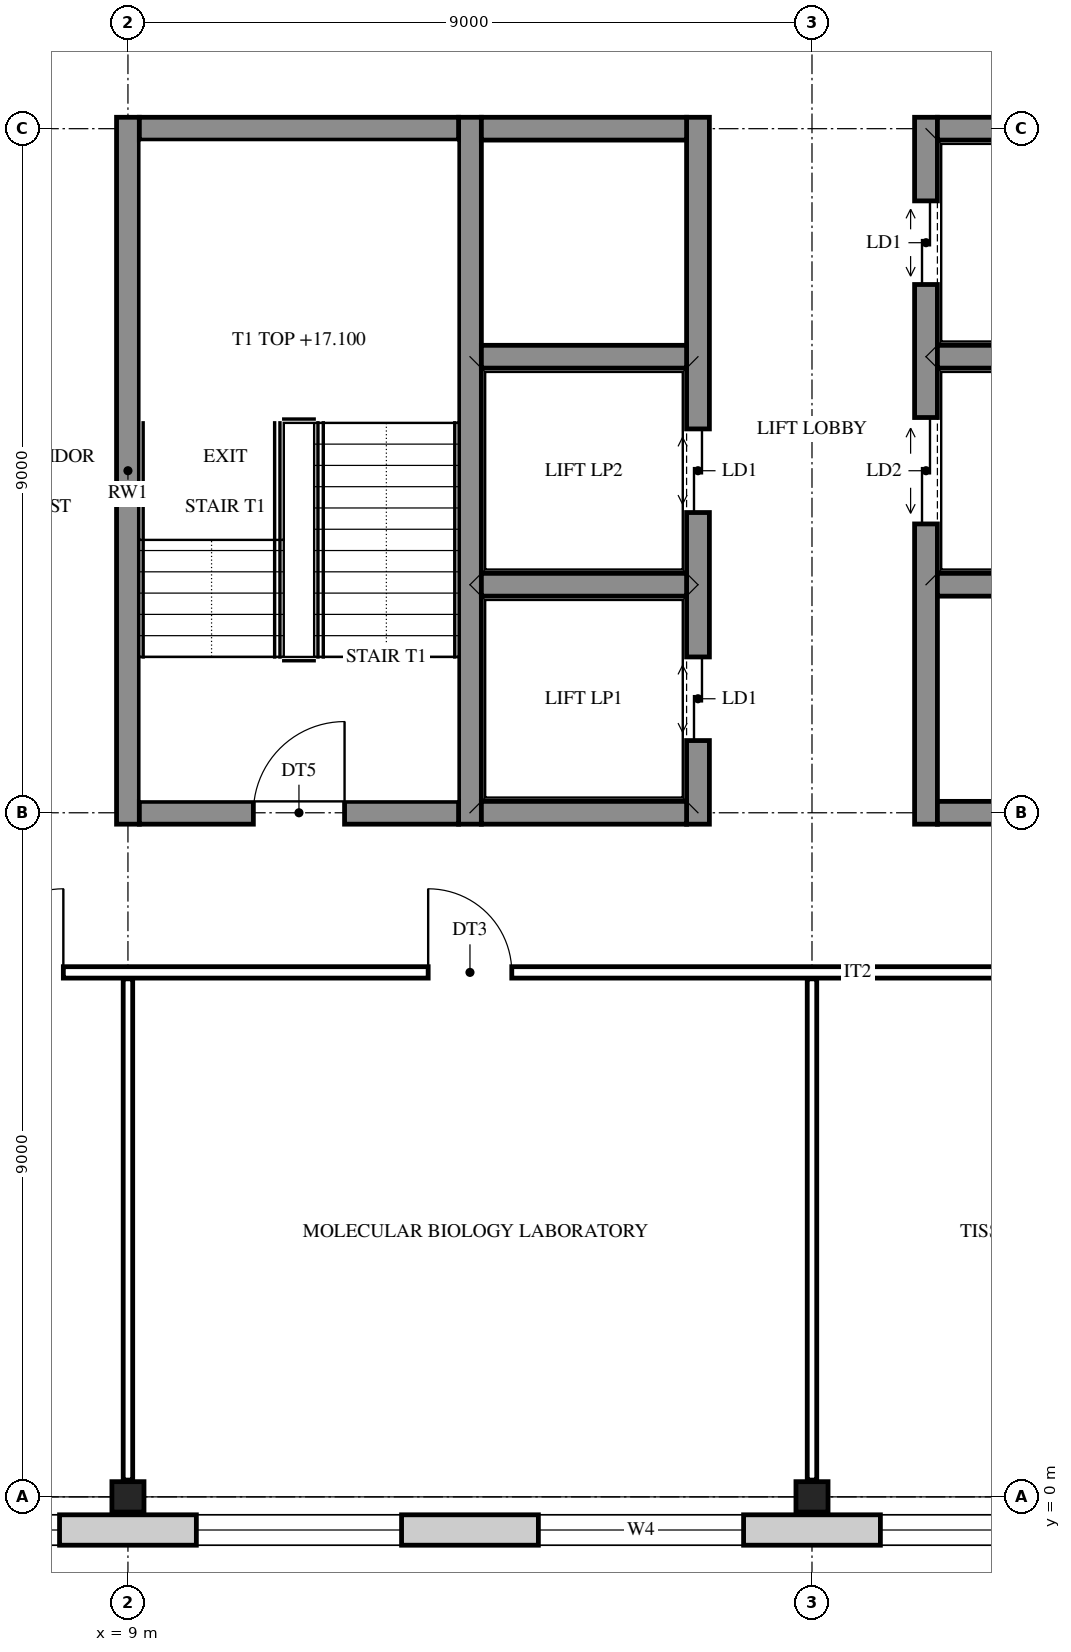
"""IFC4 building model, lengths in metres.
Left out: names, types, materials, properties, quantities, classifications, styles, units other than length and angle.
Written with IfcOpenShell. Run it as: python <this file> out.ifc"""

import sys

from ifc_helpers import new_model, si_unit, direction, frame, frame_2d, origin, origin_2d, place, context, subcontext, project, spatial, rectangle, i_section, extrude, element, fill, save


model = new_model("IFC4")
c1 = context("Model", 3, precision=1e-05, world=origin(), true_north=direction((0.0, 1.0)))
c2 = subcontext(c1, "Body", "Model", "MODEL_VIEW")
j1 = project(units=[si_unit("LENGTHUNIT", "METRE"), si_unit("PLANEANGLEUNIT", "RADIAN")], contexts=[c1])
p1 = place(None, origin())
s1 = spatial("IfcSite", under=j1, at=p1, CompositionType="ELEMENT")
p2 = place(p1, origin())
s2 = spatial("IfcBuilding", under=s1, at=p2, CompositionType="ELEMENT")
p3 = place(p2, frame((0.0, 0.0, 15.0)))
s3 = spatial("IfcBuildingStorey", under=s2, at=p3, CompositionType="ELEMENT", Elevation=15.0)
for number, where, z_axis, x_axis in (
    (1, (9.0, 0.0, 0.0), (0.0, 0.0, 1.0), (0.0, 1.0, 0.0)),
    (2, (18.0, 0.0, 0.0), (0.0, 0.0, 1.0), (0.0, 1.0, 0.0)),
):
    element("IfcColumn", number, at=place(p3, frame(where, z_axis=z_axis, x_axis=x_axis)), inside=s3, PredefinedType="COLUMN", context=c2, shape_type="SweptSolid", body=[
        extrude(i_section(OverallWidth=0.4, OverallDepth=0.422, WebThickness=0.028, FlangeThickness=0.036, at=origin_2d()), origin(), (0.0, 0.0, 1.0), 4.2),
    ])
for number, where, z_axis, x_axis in (
    (3, (9.0, 8.85, 0.0), (0.0, 0.0, 1.0), (0.0, 1.0, 0.0)),
    (4, (13.5, 8.85, 0.0), (0.0, 0.0, 1.0), (0.0, 1.0, 0.0)),
):
    element("IfcWall", number, at=place(p3, frame(where, z_axis=z_axis, x_axis=x_axis)), inside=s3, PredefinedType="SHEAR", context=c2, shape_type="SweptSolid", body=[
        extrude(rectangle(XDim=9.3, YDim=0.3, at=frame_2d((4.65, 0.0))), origin(), (0.0, 0.0, 1.0), 4.2),
    ])
p4 = place(p3, frame((16.5, 8.85, 0.0), z_axis=(0.0, 0.0, 1.0), x_axis=(0.0, 1.0, 0.0)))
e5 = element("IfcWall", 5, at=p4, inside=s3, PredefinedType="SHEAR", context=c2, shape_type="SweptSolid", body=[
    extrude(rectangle(XDim=9.3, YDim=0.3, at=frame_2d((4.65, 0.0))), origin(), (0.0, 0.0, 1.0), 4.2),
])
p5 = place(p4, frame((1.1, 0.0, 0.0)))
e6 = element("IfcOpeningElement", 6, at=p5, cuts=e5, PredefinedType="OPENING", context=c2, shape_type="SweptSolid", body=[
    extrude(rectangle(XDim=1.1, YDim=2.1, at=frame_2d((0.55, 1.05))), frame((0.0, 0.16, 0.0), z_axis=(0.0, -1.0, 0.0), x_axis=(1.0, 0.0, 0.0)), (0.0, 0.0, 1.0), 0.32),
])
p6 = place(p4, frame((4.1, 0.0, 0.0)))
e7 = element("IfcOpeningElement", 7, at=p6, cuts=e5, PredefinedType="OPENING", context=c2, shape_type="SweptSolid", body=[
    extrude(rectangle(XDim=1.1, YDim=2.1, at=frame_2d((0.55, 1.05))), frame((0.0, 0.16, 0.0), z_axis=(0.0, -1.0, 0.0), x_axis=(1.0, 0.0, 0.0)), (0.0, 0.0, 1.0), 0.32),
])
p7 = place(p3, frame((19.5, 8.85, 0.0), z_axis=(0.0, 0.0, 1.0), x_axis=(0.0, 1.0, 0.0)))
e8 = element("IfcWall", 8, at=p7, inside=s3, PredefinedType="SHEAR", context=c2, shape_type="SweptSolid", body=[
    extrude(rectangle(XDim=9.3, YDim=0.3, at=frame_2d((4.65, 0.0))), origin(), (0.0, 0.0, 1.0), 4.2),
])
p8 = place(p7, frame((3.95, 0.0, 0.0)))
e9 = element("IfcOpeningElement", 9, at=p8, cuts=e8, PredefinedType="OPENING", context=c2, shape_type="SweptSolid", body=[
    extrude(rectangle(XDim=1.4, YDim=2.1, at=frame_2d((0.7, 1.05))), frame((0.0, 0.16, 0.0), z_axis=(0.0, -1.0, 0.0), x_axis=(1.0, 0.0, 0.0)), (0.0, 0.0, 1.0), 0.32),
])
p9 = place(p7, frame((7.1, 0.0, 0.0)))
e10 = element("IfcOpeningElement", 10, at=p9, cuts=e8, PredefinedType="OPENING", context=c2, shape_type="SweptSolid", body=[
    extrude(rectangle(XDim=1.1, YDim=2.1, at=frame_2d((0.55, 1.05))), frame((0.0, 0.16, 0.0), z_axis=(0.0, -1.0, 0.0), x_axis=(1.0, 0.0, 0.0)), (0.0, 0.0, 1.0), 0.32),
])
p10 = place(p3, frame((9.15, 9.0, 0.0), z_axis=(0.0, 0.0, 1.0), x_axis=(1.0, 0.0, 0.0)))
e11 = element("IfcWall", 11, at=p10, inside=s3, PredefinedType="SHEAR", context=c2, shape_type="SweptSolid", body=[
    extrude(rectangle(XDim=4.2, YDim=0.3, at=frame_2d((2.1, 0.0))), origin(), (0.0, 0.0, 1.0), 4.2),
])
p11 = place(p10, frame((1.5, 0.0, 0.0)))
e12 = element("IfcOpeningElement", 12, at=p11, cuts=e11, PredefinedType="OPENING", context=c2, shape_type="SweptSolid", body=[
    extrude(rectangle(XDim=1.2, YDim=2.1, at=frame_2d((0.6, 1.05))), frame((0.0, 0.16, 0.0), z_axis=(0.0, -1.0, 0.0), x_axis=(1.0, 0.0, 0.0)), (0.0, 0.0, 1.0), 0.32),
])
for number, where, z_axis, x_axis in (
    (13, (13.65, 9.0, 0.0), (0.0, 0.0, 1.0), (1.0, 0.0, 0.0)),
    (14, (19.65, 9.0, 0.0), (0.0, 0.0, 1.0), (1.0, 0.0, 0.0)),
    (15, (13.65, 12.0, 0.0), (0.0, 0.0, 1.0), (1.0, 0.0, 0.0)),
    (16, (19.65, 12.0, 0.0), (0.0, 0.0, 1.0), (1.0, 0.0, 0.0)),
    (17, (13.65, 15.0, 0.0), (0.0, 0.0, 1.0), (1.0, 0.0, 0.0)),
    (18, (19.65, 15.0, 0.0), (0.0, 0.0, 1.0), (1.0, 0.0, 0.0)),
):
    element("IfcWall", number, at=place(p3, frame(where, z_axis=z_axis, x_axis=x_axis)), inside=s3, PredefinedType="SHEAR", context=c2, shape_type="SweptSolid", body=[
        extrude(rectangle(XDim=2.7, YDim=0.3, at=frame_2d((1.35, 0.0))), origin(), (0.0, 0.0, 1.0), 4.2),
    ])
p12 = place(p3, frame((9.15, 18.0, 0.0), z_axis=(0.0, 0.0, 1.0), x_axis=(1.0, 0.0, 0.0)))
e19 = element("IfcWall", 19, at=p12, inside=s3, PredefinedType="SHEAR", context=c2, shape_type="SweptSolid", body=[
    extrude(rectangle(XDim=4.2, YDim=0.3, at=frame_2d((2.1, 0.0))), origin(), (0.0, 0.0, 1.0), 4.2),
])
for number, where, z_axis, x_axis in (
    (20, (13.65, 18.0, 0.0), (0.0, 0.0, 1.0), (1.0, 0.0, 0.0)),
    (21, (19.65, 18.0, 0.0), (0.0, 0.0, 1.0), (1.0, 0.0, 0.0)),
):
    element("IfcWall", number, at=place(p3, frame(where, z_axis=z_axis, x_axis=x_axis)), inside=s3, PredefinedType="SHEAR", context=c2, shape_type="SweptSolid", body=[
        extrude(rectangle(XDim=2.7, YDim=0.3, at=frame_2d((1.35, 0.0))), origin(), (0.0, 0.0, 1.0), 4.2),
    ])
p13 = place(p3, frame((32.125, -0.436, 0.0), z_axis=(0.0, 0.0, 1.0), x_axis=(-1.0, 0.0, 0.0)))
e22 = element("IfcWall", 22, at=p13, inside=s3, PredefinedType="STANDARD", context=c2, shape_type="SweptSolid", body=[
    extrude(rectangle(XDim=32.75, YDim=0.4, at=frame_2d((16.375, 0.0))), origin(), (0.0, 0.0, 1.0), 4.2),
])
p14 = place(p13, frame((28.525, 0.0, 0.9)))
e23 = element("IfcOpeningElement", 23, at=p14, cuts=e22, PredefinedType="OPENING", context=c2, shape_type="SweptSolid", body=[
    extrude(rectangle(XDim=2.7, YDim=2.5, at=frame_2d((1.35, 1.25))), frame((0.0, 0.21, 0.0), z_axis=(0.0, -1.0, 0.0), x_axis=(1.0, 0.0, 0.0)), (0.0, 0.0, 1.0), 0.42),
])
p15 = place(p13, frame((24.025, 0.0, 0.9)))
e24 = element("IfcOpeningElement", 24, at=p15, cuts=e22, PredefinedType="OPENING", context=c2, shape_type="SweptSolid", body=[
    extrude(rectangle(XDim=2.7, YDim=2.5, at=frame_2d((1.35, 1.25))), frame((0.0, 0.21, 0.0), z_axis=(0.0, -1.0, 0.0), x_axis=(1.0, 0.0, 0.0)), (0.0, 0.0, 1.0), 0.42),
])
p16 = place(p13, frame((19.525, 0.0, 0.9)))
e25 = element("IfcOpeningElement", 25, at=p16, cuts=e22, PredefinedType="OPENING", context=c2, shape_type="SweptSolid", body=[
    extrude(rectangle(XDim=2.7, YDim=2.5, at=frame_2d((1.35, 1.25))), frame((0.0, 0.21, 0.0), z_axis=(0.0, -1.0, 0.0), x_axis=(1.0, 0.0, 0.0)), (0.0, 0.0, 1.0), 0.42),
])
p17 = place(p13, frame((15.025, 0.0, 0.9)))
e26 = element("IfcOpeningElement", 26, at=p17, cuts=e22, PredefinedType="OPENING", context=c2, shape_type="SweptSolid", body=[
    extrude(rectangle(XDim=2.7, YDim=2.5, at=frame_2d((1.35, 1.25))), frame((0.0, 0.21, 0.0), z_axis=(0.0, -1.0, 0.0), x_axis=(1.0, 0.0, 0.0)), (0.0, 0.0, 1.0), 0.42),
])
p18 = place(p13, frame((10.525, 0.0, 0.9)))
e27 = element("IfcOpeningElement", 27, at=p18, cuts=e22, PredefinedType="OPENING", context=c2, shape_type="SweptSolid", body=[
    extrude(rectangle(XDim=2.7, YDim=2.5, at=frame_2d((1.35, 1.25))), frame((0.0, 0.21, 0.0), z_axis=(0.0, -1.0, 0.0), x_axis=(1.0, 0.0, 0.0)), (0.0, 0.0, 1.0), 0.42),
])
p19 = place(p13, frame((6.025, 0.0, 0.9)))
e28 = element("IfcOpeningElement", 28, at=p19, cuts=e22, PredefinedType="OPENING", context=c2, shape_type="SweptSolid", body=[
    extrude(rectangle(XDim=2.7, YDim=2.5, at=frame_2d((1.35, 1.25))), frame((0.0, 0.21, 0.0), z_axis=(0.0, -1.0, 0.0), x_axis=(1.0, 0.0, 0.0)), (0.0, 0.0, 1.0), 0.42),
])
p20 = place(p13, frame((1.525, 0.0, 0.9)))
e29 = element("IfcOpeningElement", 29, at=p20, cuts=e22, PredefinedType="OPENING", context=c2, shape_type="SweptSolid", body=[
    extrude(rectangle(XDim=2.7, YDim=2.5, at=frame_2d((1.35, 1.25))), frame((0.0, 0.21, 0.0), z_axis=(0.0, -1.0, 0.0), x_axis=(1.0, 0.0, 0.0)), (0.0, 0.0, 1.0), 0.42),
])
for number, where, z_axis, x_axis in (
    (30, (9.0, 0.221, 0.0), (0.0, 0.0, 1.0), (0.0, 1.0, 0.0)),
    (31, (18.0, 0.221, 0.0), (0.0, 0.0, 1.0), (0.0, 1.0, 0.0)),
):
    element("IfcWall", number, at=place(p3, frame(where, z_axis=z_axis, x_axis=x_axis)), inside=s3, PredefinedType="PARTITIONING", context=c2, shape_type="SweptSolid", body=[
        extrude(rectangle(XDim=6.594, YDim=0.125, at=frame_2d((3.297, 0.0))), origin(), (0.0, 0.0, 1.0), 3.537),
    ])
p21 = place(p3, frame((6.9, 6.9, 0.0), z_axis=(0.0, 0.0, 1.0), x_axis=(1.0, 0.0, 0.0)))
e32 = element("IfcWall", 32, at=p21, inside=s3, PredefinedType="PARTITIONING", context=c2, shape_type="SweptSolid", body=[
    extrude(rectangle(XDim=20.1, YDim=0.15, at=frame_2d((10.05, 0.0))), origin(), (0.0, 0.0, 1.0), 3.537),
])
p22 = place(p21, frame((0.15, 0.0, 0.0)))
e33 = element("IfcOpeningElement", 33, at=p22, cuts=e32, PredefinedType="OPENING", context=c2, shape_type="SweptSolid", body=[
    extrude(rectangle(XDim=1.1, YDim=2.1, at=frame_2d((0.55, 1.05))), frame((0.0, 0.085, 0.0), z_axis=(0.0, -1.0, 0.0), x_axis=(1.0, 0.0, 0.0)), (0.0, 0.0, 1.0), 0.17),
])
p23 = place(p21, frame((6.05, 0.0, 0.0)))
e34 = element("IfcOpeningElement", 34, at=p23, cuts=e32, PredefinedType="OPENING", context=c2, shape_type="SweptSolid", body=[
    extrude(rectangle(XDim=1.1, YDim=2.1, at=frame_2d((0.55, 1.05))), frame((0.0, 0.085, 0.0), z_axis=(0.0, -1.0, 0.0), x_axis=(1.0, 0.0, 0.0)), (0.0, 0.0, 1.0), 0.17),
])
p24 = place(p21, frame((16.25, 0.0, 0.0)))
e35 = element("IfcOpeningElement", 35, at=p24, cuts=e32, PredefinedType="OPENING", context=c2, shape_type="SweptSolid", body=[
    extrude(rectangle(XDim=1.1, YDim=2.1, at=frame_2d((0.55, 1.05))), frame((0.0, 0.085, 0.0), z_axis=(0.0, -1.0, 0.0), x_axis=(1.0, 0.0, 0.0)), (0.0, 0.0, 1.0), 0.17),
])
p25 = place(p15, origin())
e36 = element("IfcWindow", 36, at=p25, inside=s3, PartitioningType="SINGLE_PANEL", PredefinedType="WINDOW", context=c2, shape_type="SweptSolid", body=[
    extrude(rectangle(XDim=2.7, YDim=2.5, at=frame_2d((1.35, 1.25))), frame((0.0, 0.03, 0.0), z_axis=(0.0, -1.0, 0.0), x_axis=(1.0, 0.0, 0.0)), (0.0, 0.0, 1.0), 0.06),
])
fill(e24, e36)
p26 = place(p16, origin())
e37 = element("IfcWindow", 37, at=p26, inside=s3, PartitioningType="SINGLE_PANEL", PredefinedType="WINDOW", context=c2, shape_type="SweptSolid", body=[
    extrude(rectangle(XDim=2.7, YDim=2.5, at=frame_2d((1.35, 1.25))), frame((0.0, 0.03, 0.0), z_axis=(0.0, -1.0, 0.0), x_axis=(1.0, 0.0, 0.0)), (0.0, 0.0, 1.0), 0.06),
])
fill(e25, e37)
p27 = place(p17, origin())
e38 = element("IfcWindow", 38, at=p27, inside=s3, PartitioningType="SINGLE_PANEL", PredefinedType="WINDOW", context=c2, shape_type="SweptSolid", body=[
    extrude(rectangle(XDim=2.7, YDim=2.5, at=frame_2d((1.35, 1.25))), frame((0.0, 0.03, 0.0), z_axis=(0.0, -1.0, 0.0), x_axis=(1.0, 0.0, 0.0)), (0.0, 0.0, 1.0), 0.06),
])
fill(e26, e38)
p28 = place(p18, origin())
e39 = element("IfcWindow", 39, at=p28, inside=s3, PartitioningType="SINGLE_PANEL", PredefinedType="WINDOW", context=c2, shape_type="SweptSolid", body=[
    extrude(rectangle(XDim=2.7, YDim=2.5, at=frame_2d((1.35, 1.25))), frame((0.0, 0.03, 0.0), z_axis=(0.0, -1.0, 0.0), x_axis=(1.0, 0.0, 0.0)), (0.0, 0.0, 1.0), 0.06),
])
fill(e27, e39)
p29 = place(p11, origin())
e40 = element("IfcDoor", 40, at=p29, inside=s3, OperationType="SINGLE_SWING_RIGHT", PredefinedType="DOOR", context=c2, shape_type="SweptSolid", body=[
    extrude(rectangle(XDim=1.2, YDim=2.1, at=frame_2d((0.6, 1.05))), frame((0.0, 0.025, 0.0), z_axis=(0.0, -1.0, 0.0), x_axis=(1.0, 0.0, 0.0)), (0.0, 0.0, 1.0), 0.05),
])
fill(e12, e40)
p30 = place(p22, frame((1.1, 0.0, 0.0), z_axis=(0.0, 0.0, 1.0), x_axis=(-1.0, 0.0, 0.0)))
e41 = element("IfcDoor", 41, at=p30, inside=s3, OperationType="SINGLE_SWING_RIGHT", PredefinedType="DOOR", context=c2, shape_type="SweptSolid", body=[
    extrude(rectangle(XDim=1.1, YDim=2.1, at=frame_2d((0.55, 1.05))), frame((0.0, 0.025, 0.0), z_axis=(0.0, -1.0, 0.0), x_axis=(1.0, 0.0, 0.0)), (0.0, 0.0, 1.0), 0.05),
])
fill(e33, e41)
p31 = place(p23, frame((1.1, 0.0, 0.0), z_axis=(0.0, 0.0, 1.0), x_axis=(-1.0, 0.0, 0.0)))
e42 = element("IfcDoor", 42, at=p31, inside=s3, OperationType="SINGLE_SWING_LEFT", PredefinedType="DOOR", context=c2, shape_type="SweptSolid", body=[
    extrude(rectangle(XDim=1.1, YDim=2.1, at=frame_2d((0.55, 1.05))), frame((0.0, 0.025, 0.0), z_axis=(0.0, -1.0, 0.0), x_axis=(1.0, 0.0, 0.0)), (0.0, 0.0, 1.0), 0.05),
])
fill(e34, e42)
p32 = place(p5, origin())
e43 = element("IfcDoor", 43, at=p32, inside=s3, OperationType="DOUBLE_DOOR_SLIDING", PredefinedType="DOOR", context=c2, shape_type="SweptSolid", body=[
    extrude(rectangle(XDim=1.1, YDim=2.1, at=frame_2d((0.55, 1.05))), frame((0.0, 0.025, 0.0), z_axis=(0.0, -1.0, 0.0), x_axis=(1.0, 0.0, 0.0)), (0.0, 0.0, 1.0), 0.05),
])
fill(e6, e43)
p33 = place(p6, origin())
e44 = element("IfcDoor", 44, at=p33, inside=s3, OperationType="DOUBLE_DOOR_SLIDING", PredefinedType="DOOR", context=c2, shape_type="SweptSolid", body=[
    extrude(rectangle(XDim=1.1, YDim=2.1, at=frame_2d((0.55, 1.05))), frame((0.0, 0.025, 0.0), z_axis=(0.0, -1.0, 0.0), x_axis=(1.0, 0.0, 0.0)), (0.0, 0.0, 1.0), 0.05),
])
fill(e7, e44)
p34 = place(p8, origin())
e45 = element("IfcDoor", 45, at=p34, inside=s3, OperationType="DOUBLE_DOOR_SLIDING", PredefinedType="DOOR", context=c2, shape_type="SweptSolid", body=[
    extrude(rectangle(XDim=1.4, YDim=2.1, at=frame_2d((0.7, 1.05))), frame((0.0, 0.025, 0.0), z_axis=(0.0, -1.0, 0.0), x_axis=(1.0, 0.0, 0.0)), (0.0, 0.0, 1.0), 0.05),
])
fill(e9, e45)
p35 = place(p9, origin())
e46 = element("IfcDoor", 46, at=p35, inside=s3, OperationType="DOUBLE_DOOR_SLIDING", PredefinedType="DOOR", context=c2, shape_type="SweptSolid", body=[
    extrude(rectangle(XDim=1.1, YDim=2.1, at=frame_2d((0.55, 1.05))), frame((0.0, 0.025, 0.0), z_axis=(0.0, -1.0, 0.0), x_axis=(1.0, 0.0, 0.0)), (0.0, 0.0, 1.0), 0.05),
])
fill(e10, e46)
save(model, sys.argv[1])
